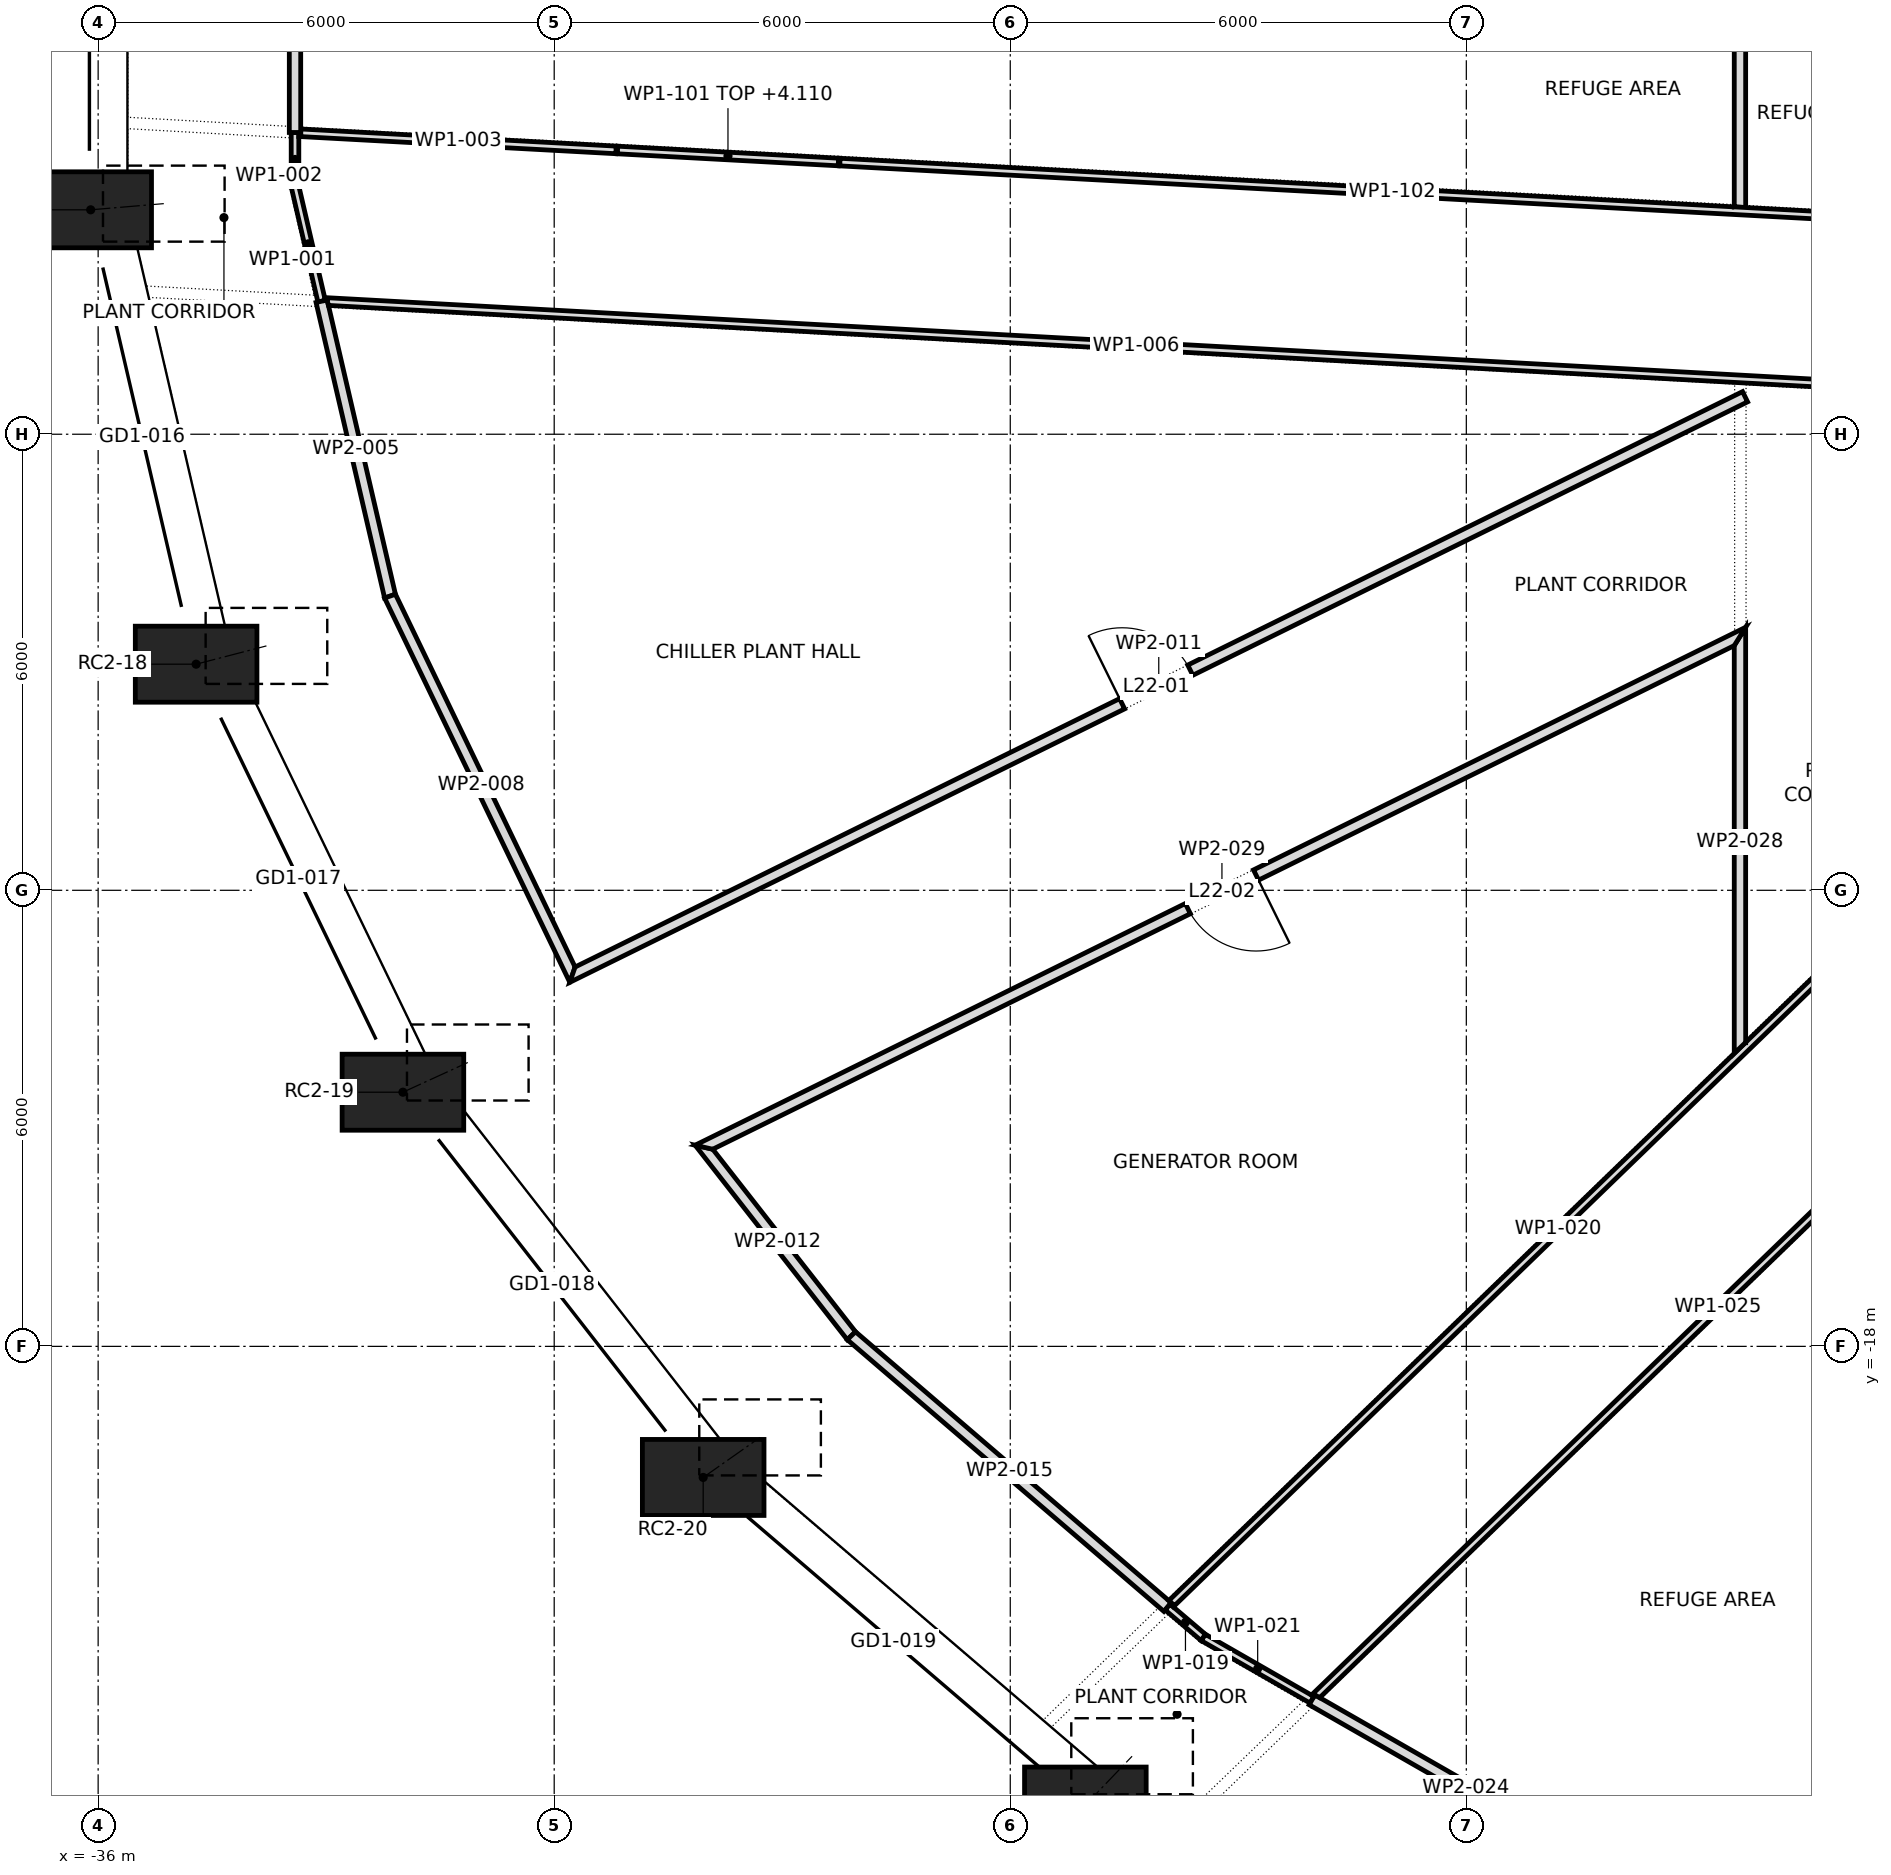
"""IFC4 building model, lengths in metres.
Left out: names, types, materials, properties, quantities, classifications, styles, units other than length and angle.
Written with IfcOpenShell. Run it as: python <this file> out.ifc"""

import sys

from ifc_helpers import new_model, si_unit, direction, frame, frame_2d, origin, origin_2d, place, context, subcontext, project, spatial, polyline, rectangle, outline, extrude, element, fill, save


model = new_model("IFC4")
c1 = context("Model", 3, precision=1e-05, world=origin(), true_north=direction((0.0, 1.0)))
c2 = subcontext(c1, "Body", "Model", "MODEL_VIEW")
j1 = project(units=[si_unit("LENGTHUNIT", "METRE"), si_unit("PLANEANGLEUNIT", "RADIAN")], contexts=[c1])
p1 = place(None, origin())
s1 = spatial("IfcSite", under=j1, at=p1, CompositionType="ELEMENT")
p2 = place(p1, origin())
s2 = spatial("IfcBuilding", under=s1, at=p2, CompositionType="ELEMENT")
p3 = place(p2, frame((0.0, 0.0, 99.1)))
s3 = spatial("IfcBuildingStorey", under=s2, at=p3, CompositionType="ELEMENT", Elevation=99.1)
p4 = place(p3, frame((-36.098, -3.048, 0.091), z_axis=(0.181244204702, 0.015318355372, 0.983318812111), x_axis=(-0.08421750827, 0.99644739515, 0.0)))
e1 = element("IfcColumn", 1, at=p4, inside=s3, PredefinedType="COLUMN", context=c2, shape_type="SweptSolid", body=[
    extrude(rectangle(XDim=1.6, YDim=1.0, at=origin_2d()), origin(), (0.0, 0.0, 1.0), 5.307),
])
p5 = place(p3, frame((-34.711, -9.025, 0.09), z_axis=(0.174299234712, 0.045357362213, 0.983647541791), x_axis=(-0.251839594723, 0.967768990271, 0.0)))
e2 = element("IfcColumn", 2, at=p5, inside=s3, PredefinedType="COLUMN", context=c2, shape_type="SweptSolid", body=[
    extrude(rectangle(XDim=1.6, YDim=1.0, at=origin_2d()), origin(), (0.0, 0.0, 1.0), 5.307),
])
p6 = place(p3, frame((-31.99, -14.656, 0.088), z_axis=(0.160721780276, 0.073644982891, 0.984248406572), x_axis=(-0.416565116305, 0.909105881555, 0.0)))
e3 = element("IfcColumn", 3, at=p6, inside=s3, PredefinedType="COLUMN", context=c2, shape_type="SweptSolid", body=[
    extrude(rectangle(XDim=1.6, YDim=1.0, at=origin_2d()), origin(), (0.0, 0.0, 1.0), 5.307),
])
p7 = place(p3, frame((-28.04, -19.724, 0.086), z_axis=(0.140981797412, 0.099170230088, 0.985032688931), x_axis=(-0.575341361803, 0.817913392358, 0.0)))
e4 = element("IfcColumn", 4, at=p7, inside=s3, PredefinedType="COLUMN", context=c2, shape_type="SweptSolid", body=[
    extrude(rectangle(XDim=1.6, YDim=1.0, at=origin_2d()), origin(), (0.0, 0.0, 1.0), 5.308),
])
p8 = place(p3, frame((-23.012, -24.034, 0.083), z_axis=(0.115812481815, 0.12096379157, 0.985877898213), x_axis=(-0.722319686129, 0.691559304059, 0.0)))
e5 = element("IfcColumn", 5, at=p8, inside=s3, PredefinedType="COLUMN", context=c2, shape_type="SweptSolid", body=[
    extrude(rectangle(XDim=1.6, YDim=1.0, at=origin_2d()), origin(), (0.0, 0.0, 1.0), 5.308),
])
p9 = place(p3, frame((-33.411, -2.734, 0.0), z_axis=(0.0, 0.0, 1.0), x_axis=(0.225810628432, -0.974171217029, 0.0)))
e6 = element("IfcWall", 6, at=p9, inside=s3, PredefinedType="PARTITIONING", context=c2, shape_type="SweptSolid", body=[
    extrude(outline(polyline([(1.556, 0.05), (0.011, 0.05), (0.0, -0.05), (1.556, -0.05), (1.556, 0.05)])), origin(), (0.0, 0.0, 1.0), 5.1),
])
p10 = place(p3, frame((-33.41, -2.03, 0.0), z_axis=(0.0, 0.0, 1.0), x_axis=(0.0, -1.0, 0.0)))
e7 = element("IfcWall", 7, at=p10, inside=s3, PredefinedType="PARTITIONING", context=c2, shape_type="SweptSolid", body=[
    extrude(outline(polyline([(0.716, -0.05), (0.716, -0.049), (0.704, 0.05), (0.0, 0.05), (0.0, -0.05), (0.716, -0.05)])), origin(), (0.0, 0.0, 1.0), 5.1),
])
p11 = place(p3, frame((-33.357, -2.033, 0.0), z_axis=(0.0, 0.0, 1.0), x_axis=(0.998528308969, -0.054232980631, 0.0)))
e8 = element("IfcWall", 8, at=p11, inside=s3, PredefinedType="PARTITIONING", context=c2, shape_type="SweptSolid", body=[
    extrude(outline(polyline([(4.187, 0.05), (2.798, 0.05), (1.408, 0.05), (0.02, 0.05), (0.022, 0.004), (0.0, 0.003), (0.0, -0.05), (1.396, -0.05), (2.791, -0.05), (4.187, -0.05), (4.187, 0.05)])), origin(), (0.0, 0.0, 1.0), 5.1),
])
p12 = place(p3, frame((-33.41, 2.749, 0.0), z_axis=(0.0, 0.0, 1.0), x_axis=(0.0, -1.0, 0.0)))
e9 = element("IfcWall", 9, at=p12, inside=s3, PredefinedType="PARTITIONING", context=c2, shape_type="SweptSolid", body=[
    extrude(outline(polyline([(4.779, 0.075), (3.191, 0.075), (1.604, 0.075), (0.017, 0.075), (0.0, -0.075), (0.0, -0.075), (1.593, -0.075), (3.186, -0.075), (4.779, -0.075), (4.779, 0.075)])), origin(), (0.0, 0.0, 1.0), 5.1),
])
p13 = place(p3, frame((-33.06, -4.25, 0.0), z_axis=(0.0, 0.0, 1.0), x_axis=(0.225949368313, -0.974139047035, 0.0)))
e10 = element("IfcWall", 10, at=p13, inside=s3, PredefinedType="PARTITIONING", context=c2, shape_type="SweptSolid", body=[
    extrude(outline(polyline([(0.0, -0.075), (1.996, -0.075), (3.991, -0.075), (3.975, 0.075), (1.987, 0.075), (0.0, 0.075), (0.0, -0.075)])), origin(), (0.0, 0.0, 1.0), 5.1),
])
p14 = place(p3, frame((-33.022, -4.252, 0.0), z_axis=(0.0, 0.0, 1.0), x_axis=(0.998503734749, -0.054683559624, 0.0)))
e11 = element("IfcWall", 11, at=p14, inside=s3, PredefinedType="PARTITIONING", context=c2, shape_type="SweptSolid", body=[
    extrude(outline(polyline([(0.0, 0.05), (0.0, 0.049), (0.01, 0.014), (0.034, 0.021), (0.055, -0.05), (1.991, -0.05), (3.927, -0.05), (5.864, -0.05), (7.8, -0.05), (9.736, -0.05), (11.673, -0.05), (13.609, -0.05), (15.545, -0.05), (17.482, -0.05), (19.418, -0.05), (21.354, -0.05), (21.354, 0.05), (19.413, 0.05), (17.472, 0.05), (15.53, 0.05), (13.589, 0.05), (11.648, 0.05), (9.707, 0.05), (7.765, 0.05), (5.824, 0.05), (3.883, 0.05), (1.941, 0.05), (0.0, 0.05)])), origin(), (0.0, 0.0, 1.0), 5.1),
])
p15 = place(p3, frame((-32.164, -8.123, 0.0), z_axis=(0.0, 0.0, 1.0), x_axis=(0.434115125131, -0.900857401664, 0.0)))
e12 = element("IfcWall", 12, at=p15, inside=s3, PredefinedType="PARTITIONING", context=c2, shape_type="SweptSolid", body=[
    extrude(outline(polyline([(5.612, -0.075), (5.612, -0.075), (5.461, 0.075), (3.646, 0.075), (1.831, 0.075), (0.017, 0.075), (0.0, -0.074), (0.0, -0.075), (1.871, -0.075), (3.741, -0.075), (5.612, -0.075)])), origin(), (0.0, 0.0, 1.0), 5.1),
])
p16 = place(p3, frame((-29.828, -13.143, 0.0), z_axis=(0.0, 0.0, 1.0), x_axis=(0.896984577942, 0.442061836098, 0.0)))
e13 = element("IfcWall", 13, at=p16, inside=s3, PredefinedType="PARTITIONING", context=c2, shape_type="SweptSolid", body=[
    extrude(outline(polyline([(17.275, 0.075), (15.372, 0.075), (13.469, 0.075), (11.567, 0.075), (9.664, 0.075), (7.762, 0.075), (5.859, 0.075), (3.957, 0.075), (2.054, 0.075), (0.151, 0.075), (0.0, -0.075), (1.919, -0.075), (3.839, -0.075), (5.758, -0.075), (7.678, -0.075), (9.597, -0.075), (11.517, -0.075), (13.436, -0.075), (15.355, -0.075), (17.275, -0.075), (17.275, 0.075)])), origin(), (0.0, 0.0, 1.0), 5.1),
])
p17 = place(p16, frame((8.138, 0.0, 0.0)))
e14 = element("IfcOpeningElement", 14, at=p17, cuts=e13, PredefinedType="OPENING", context=c2, shape_type="SweptSolid", body=[
    extrude(rectangle(XDim=1.0, YDim=2.1, at=frame_2d((0.5, 1.05))), frame((0.0, 0.087, 0.0), z_axis=(0.0, -1.0, 0.0), x_axis=(1.0, 0.0, 0.0)), (0.0, 0.0, 1.0), 0.174),
])
p18 = place(p3, frame((-28.087, -15.307, 0.0), z_axis=(0.0, 0.0, 1.0), x_axis=(0.616133967793, -0.787641373807, 0.0)))
e15 = element("IfcWall", 15, at=p18, inside=s3, PredefinedType="PARTITIONING", context=c2, shape_type="SweptSolid", body=[
    extrude(outline(polyline([(0.0, -0.075), (1.624, -0.075), (3.248, -0.075), (3.233, 0.075), (1.709, 0.075), (0.184, 0.075), (0.0, -0.075), (0.0, -0.075)])), origin(), (0.0, 0.0, 1.0), 5.1),
])
p19 = place(p3, frame((-26.096, -17.855, 0.0), z_axis=(0.0, 0.0, 1.0), x_axis=(0.758892304341, -0.651216147229, 0.0)))
e16 = element("IfcWall", 16, at=p19, inside=s3, PredefinedType="PARTITIONING", context=c2, shape_type="SweptSolid", body=[
    extrude(outline(polyline([(5.489, 0.075), (3.665, 0.075), (1.84, 0.075), (0.015, 0.075), (0.0, -0.075), (0.0, -0.075), (1.83, -0.075), (3.659, -0.075), (5.489, -0.075), (5.489, 0.075)])), origin(), (0.0, 0.0, 1.0), 5.1),
])
p20 = place(p3, frame((-21.93, -21.43, 0.0), z_axis=(0.0, 0.0, 1.0), x_axis=(0.761386795388, -0.648297885088, 0.0)))
e17 = element("IfcWall", 17, at=p20, inside=s3, PredefinedType="PARTITIONING", context=c2, shape_type="SweptSolid", body=[
    extrude(outline(polyline([(0.0, -0.05), (0.622, -0.05), (0.613, 0.05), (0.0, 0.05), (0.0, -0.05)])), origin(), (0.0, 0.0, 1.0), 5.1),
])
p21 = place(p3, frame((-21.89, -21.391, 0.0), z_axis=(0.0, 0.0, 1.0), x_axis=(0.718607137454, 0.695416265269, 0.0)))
e18 = element("IfcWall", 18, at=p21, inside=s3, PredefinedType="PARTITIONING", context=c2, shape_type="SweptSolid", body=[
    extrude(outline(polyline([(14.18, 0.05), (12.378, 0.05), (10.576, 0.05), (10.573, 0.047), (10.57, 0.05), (8.811, 0.05), (7.052, 0.05), (5.292, 0.05), (3.533, 0.05), (1.774, 0.05), (0.015, 0.05), (0.019, 0.007), (0.0, 0.005), (0.0, -0.05), (1.772, -0.05), (3.545, -0.05), (5.318, -0.05), (7.09, -0.05), (8.863, -0.05), (10.635, -0.05), (12.408, -0.05), (14.18, -0.05), (14.18, 0.05)])), origin(), (0.0, 0.0, 1.0), 5.1),
])
p22 = place(p3, frame((-21.464, -21.828, 0.0), z_axis=(0.0, 0.0, 1.0), x_axis=(0.867515133923, -0.497410788398, 0.0)))
e19 = element("IfcWall", 19, at=p22, inside=s3, PredefinedType="PARTITIONING", context=c2, shape_type="SweptSolid", body=[
    extrude(outline(polyline([(1.653, 0.05), (0.009, 0.05), (0.0, -0.05), (1.653, -0.05), (1.653, 0.05)])), origin(), (0.0, 0.0, 1.0), 5.1),
])
p23 = place(p3, frame((-20.03, -22.65, 0.0), z_axis=(0.0, 0.0, 1.0), x_axis=(0.867705864806, -0.497077994062, 0.0)))
e20 = element("IfcWall", 20, at=p23, inside=s3, PredefinedType="PARTITIONING", context=c2, shape_type="SweptSolid", body=[
    extrude(outline(polyline([(0.0, -0.075), (1.558, -0.075), (3.116, -0.075), (4.674, -0.075), (4.661, 0.075), (3.107, 0.075), (1.553, 0.075), (0.0, 0.075), (0.0, -0.075)])), origin(), (0.0, 0.0, 1.0), 5.1),
])
p24 = place(p3, frame((-20.003, -22.624, 0.0), z_axis=(0.0, 0.0, 1.0), x_axis=(0.718850780889, 0.695164408478, 0.0)))
e21 = element("IfcWall", 21, at=p24, inside=s3, PredefinedType="PARTITIONING", context=c2, shape_type="SweptSolid", body=[
    extrude(outline(polyline([(0.054, -0.05), (2.043, -0.05), (4.031, -0.05), (6.02, -0.05), (8.008, -0.05), (9.997, -0.05), (11.985, -0.05), (11.987, -0.048), (11.989, -0.05), (13.369, -0.05), (14.75, -0.05), (14.75, 0.05), (12.906, 0.05), (11.062, 0.05), (9.219, 0.05), (7.375, 0.05), (5.531, 0.05), (3.688, 0.05), (1.844, 0.05), (0.0, 0.05), (0.0, 0.049), (0.01, 0.014), (0.034, 0.021), (0.054, -0.05)])), origin(), (0.0, 0.0, 1.0), 5.1),
])
p25 = place(p3, frame((-14.4, -14.147, 0.0), z_axis=(0.0, 0.0, 1.0), x_axis=(0.0, 1.0, 0.0)))
e22 = element("IfcWall", 22, at=p25, inside=s3, PredefinedType="PARTITIONING", context=c2, shape_type="SweptSolid", body=[
    extrude(outline(polyline([(0.146, -0.075), (1.967, -0.075), (3.787, -0.075), (5.608, -0.075), (5.487, 0.0), (5.367, 0.075), (3.578, 0.075), (1.79, 0.075), (0.001, 0.075), (0.146, -0.075)])), origin(), (0.0, 0.0, 1.0), 5.1),
])
p26 = place(p3, frame((-14.292, -8.607, 0.0), z_axis=(0.0, 0.0, 1.0), x_axis=(-0.896913310142, -0.442206415703, 0.0)))
e23 = element("IfcWall", 23, at=p26, inside=s3, PredefinedType="PARTITIONING", context=c2, shape_type="SweptSolid", body=[
    extrude(outline(polyline([(0.0, -0.075), (1.926, -0.075), (3.853, -0.075), (5.779, -0.075), (7.705, -0.075), (9.631, -0.075), (11.557, -0.075), (13.483, -0.075), (15.409, -0.075), (15.225, 0.075), (13.352, 0.075), (11.479, 0.075), (9.606, 0.075), (7.733, 0.075), (5.86, 0.075), (3.987, 0.075), (2.114, 0.075), (0.241, 0.075), (0.0, -0.075)])), origin(), (0.0, 0.0, 1.0), 5.1),
])
p27 = place(p26, frame((7.219, 0.0, 0.0)))
e24 = element("IfcOpeningElement", 24, at=p27, cuts=e23, PredefinedType="OPENING", context=c2, shape_type="SweptSolid", body=[
    extrude(rectangle(XDim=1.0, YDim=2.1, at=frame_2d((0.5, 1.05))), frame((0.0, 0.087, 0.0), z_axis=(0.0, -1.0, 0.0), x_axis=(1.0, 0.0, 0.0)), (0.0, 0.0, 1.0), 0.174),
])
p28 = place(p3, frame((-14.4, -3.017, 0.0), z_axis=(0.0, 0.0, 1.0), x_axis=(0.0, 1.0, 0.0)))
e25 = element("IfcWall", 25, at=p28, inside=s3, PredefinedType="PARTITIONING", context=c2, shape_type="SweptSolid", body=[
    extrude(outline(polyline([(0.0, -0.075), (1.735, -0.075), (3.47, -0.075), (5.206, -0.075), (5.147, 0.0), (5.089, 0.075), (3.395, 0.075), (1.701, 0.075), (0.008, 0.075), (0.0, -0.071), (0.0, -0.075)])), origin(), (0.0, 0.0, 1.0), 5.1),
])
p29 = place(p3, frame((-29.177, -2.26, 0.0), z_axis=(0.0, 0.0, 1.0), x_axis=(0.998523031991, -0.054330052312, 0.0)))
e26 = element("IfcWall", 26, at=p29, inside=s3, PredefinedType="PARTITIONING", context=c2, shape_type="SweptSolid", body=[
    extrude(outline(polyline([(0.0, 0.05), (0.0, -0.05), (1.465, -0.05), (2.93, -0.05), (2.93, 0.05), (1.465, 0.05), (0.0, 0.05)])), origin(), (0.0, 0.0, 1.0), 4.11),
])
p30 = place(p3, frame((-26.251, -2.419, 0.0), z_axis=(0.0, 0.0, 1.0), x_axis=(0.998526637546, -0.054263745831, 0.0)))
e27 = element("IfcWall", 27, at=p30, inside=s3, PredefinedType="PARTITIONING", context=c2, shape_type="SweptSolid", body=[
    extrude(outline(polyline([(14.573, 0.05), (13.191, 0.05), (11.809, 0.05), (11.791, 0.049), (11.791, 0.05), (9.826, 0.05), (7.861, 0.05), (5.896, 0.05), (3.93, 0.05), (1.965, 0.05), (0.0, 0.05), (0.0, -0.05), (1.822, -0.05), (3.643, -0.05), (5.465, -0.05), (7.286, -0.05), (9.108, -0.05), (10.93, -0.05), (12.751, -0.05), (14.573, -0.05), (14.573, 0.05)])), origin(), (0.0, 0.0, 1.0), 5.1),
])
p31 = place(p17, origin())
e28 = element("IfcDoor", 28, at=p31, inside=s3, OperationType="SINGLE_SWING_RIGHT", PredefinedType="DOOR", context=c2, shape_type="SweptSolid", body=[
    extrude(rectangle(XDim=1.0, YDim=2.1, at=frame_2d((0.5, 1.05))), frame((0.0, 0.025, 0.0), z_axis=(0.0, -1.0, 0.0), x_axis=(1.0, 0.0, 0.0)), (0.0, 0.0, 1.0), 0.05),
])
fill(e14, e28)
p32 = place(p27, origin())
e29 = element("IfcDoor", 29, at=p32, inside=s3, OperationType="SINGLE_SWING_RIGHT", PredefinedType="DOOR", context=c2, shape_type="SweptSolid", body=[
    extrude(rectangle(XDim=1.0, YDim=2.1, at=frame_2d((0.5, 1.05))), frame((0.0, 0.025, 0.0), z_axis=(0.0, -1.0, 0.0), x_axis=(1.0, 0.0, 0.0)), (0.0, 0.0, 1.0), 0.05),
])
fill(e24, e29)
save(model, sys.argv[1])
